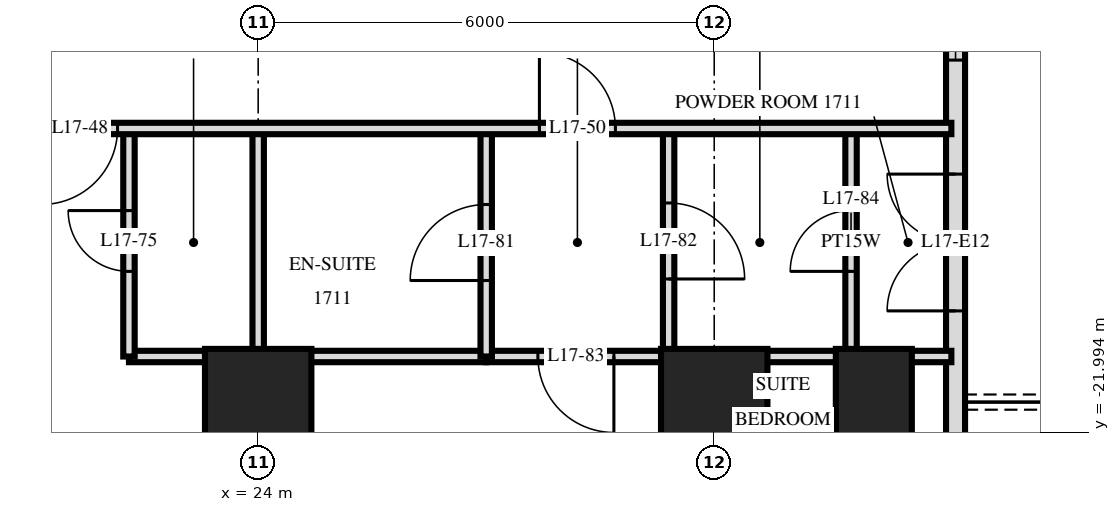
"""IFC4 building model, lengths in metres.
Left out: names, types, materials, properties, quantities, classifications, styles, units other than length and angle.
Written with IfcOpenShell. Run it as: python <this file> out.ifc"""

import sys

from ifc_helpers import new_model, si_unit, direction, frame, frame_2d, origin, origin_2d, place, context, subcontext, project, spatial, rectangle, extrude, element, fill, save


model = new_model("IFC4")
c1 = context("Model", 3, precision=1e-05, world=origin(), true_north=direction((0.0, 1.0)))
c2 = subcontext(c1, "Body", "Model", "MODEL_VIEW")
j1 = project(units=[si_unit("LENGTHUNIT", "METRE"), si_unit("PLANEANGLEUNIT", "RADIAN")], contexts=[c1])
p1 = place(None, origin())
s1 = spatial("IfcSite", under=j1, at=p1, CompositionType="ELEMENT")
p2 = place(p1, origin())
s2 = spatial("IfcBuilding", under=s1, at=p2, CompositionType="ELEMENT")
p3 = place(p2, frame((0.0, 0.0, 70.8)))
s3 = spatial("IfcBuildingStorey", under=s2, at=p3, CompositionType="ELEMENT", Elevation=70.8)
for number, where, z_axis, x_axis in (
    (1, (24.0, -21.6, 0.0), (0.0, 0.0, 1.0), (1.0, 0.0, 0.0)),
    (2, (30.0, -21.6, 0.0), (0.0, 0.0, 1.0), (1.0, 0.0, 0.0)),
):
    element("IfcColumn", number, at=place(p3, frame(where, z_axis=z_axis, x_axis=x_axis)), inside=s3, PredefinedType="COLUMN", context=c2, shape_type="SweptSolid", body=[
        extrude(rectangle(XDim=1.4, YDim=1.4, at=origin_2d()), origin(), (0.0, 0.0, 1.0), 3.6),
    ])
p4 = place(p3, frame((32.1, -21.6, 0.0), z_axis=(0.0, 0.0, 1.0), x_axis=(0.0, 1.0, 0.0)))
e3 = element("IfcColumn", 3, at=p4, inside=s3, PredefinedType="COLUMN", context=c2, shape_type="SweptSolid", body=[
    extrude(rectangle(XDim=1.4, YDim=1.0, at=origin_2d()), origin(), (0.0, 0.0, 1.0), 3.6),
])
p5 = place(p3, frame((33.175, -24.875, 0.0), z_axis=(0.0, 0.0, 1.0), x_axis=(0.0, 1.0, 0.0)))
e4 = element("IfcWall", 4, at=p5, inside=s3, PredefinedType="SOLIDWALL", context=c2, shape_type="SweptSolid", body=[
    extrude(rectangle(XDim=21.551, YDim=0.25, at=frame_2d((10.775, 0.0))), origin(), (0.0, 0.0, 1.0), 3.32),
])
p6 = place(p5, frame((0.575, 0.0, 0.0)))
e5 = element("IfcOpeningElement", 5, at=p6, cuts=e4, PredefinedType="OPENING", context=c2, shape_type="SweptSolid", body=[
    extrude(rectangle(XDim=1.8, YDim=2.4, at=frame_2d((0.9, 1.2))), frame((0.0, 0.135, 0.0), z_axis=(0.0, -1.0, 0.0), x_axis=(1.0, 0.0, 0.0)), (0.0, 0.0, 1.0), 0.27),
])
p7 = place(p5, frame((4.475, 0.0, 0.0)))
e6 = element("IfcOpeningElement", 6, at=p7, cuts=e4, PredefinedType="OPENING", context=c2, shape_type="SweptSolid", body=[
    extrude(rectangle(XDim=1.8, YDim=2.4, at=frame_2d((0.9, 1.2))), frame((0.0, 0.135, 0.0), z_axis=(0.0, -1.0, 0.0), x_axis=(1.0, 0.0, 0.0)), (0.0, 0.0, 1.0), 0.27),
])
p8 = place(p5, frame((7.775, 0.0, 0.3)))
e7 = element("IfcOpeningElement", 7, at=p8, cuts=e4, PredefinedType="OPENING", context=c2, shape_type="SweptSolid", body=[
    extrude(rectangle(XDim=1.2, YDim=2.1, at=frame_2d((0.6, 1.05))), frame((0.0, 0.135, 0.0), z_axis=(0.0, -1.0, 0.0), x_axis=(1.0, 0.0, 0.0)), (0.0, 0.0, 1.0), 0.27),
])
p9 = place(p5, frame((13.1, 0.0, 0.0)))
e8 = element("IfcOpeningElement", 8, at=p9, cuts=e4, PredefinedType="OPENING", context=c2, shape_type="SweptSolid", body=[
    extrude(rectangle(XDim=1.8, YDim=2.4, at=frame_2d((0.9, 1.2))), frame((0.0, 0.135, 0.0), z_axis=(0.0, -1.0, 0.0), x_axis=(1.0, 0.0, 0.0)), (0.0, 0.0, 1.0), 0.27),
])
p10 = place(p3, frame((31.8, -21.0, 0.0), z_axis=(0.0, 0.0, 1.0), x_axis=(0.0, 1.0, 0.0)))
e9 = element("IfcWall", 9, at=p10, inside=s3, PredefinedType="PLUMBINGWALL", context=c2, shape_type="SweptSolid", body=[
    extrude(rectangle(XDim=3.0, YDim=0.15, at=frame_2d((1.5, 0.0))), origin(), (0.0, 0.0, 1.0), 3.32),
])
p11 = place(p10, frame((1.12, 0.0, 0.0)))
e10 = element("IfcOpeningElement", 10, at=p11, cuts=e9, PredefinedType="OPENING", context=c2, shape_type="SweptSolid", body=[
    extrude(rectangle(XDim=0.8, YDim=2.1, at=frame_2d((0.4, 1.05))), frame((0.0, 0.085, 0.0), z_axis=(0.0, -1.0, 0.0), x_axis=(1.0, 0.0, 0.0)), (0.0, 0.0, 1.0), 0.17),
])
p12 = place(p3, frame((30.0, -28.978, 0.0), z_axis=(0.0, 0.0, 1.0), x_axis=(0.0, 1.0, 0.0)))
e11 = element("IfcWall", 11, at=p12, inside=s3, PredefinedType="PARTITIONING", context=c2, shape_type="SweptSolid", body=[
    extrude(rectangle(XDim=7.978, YDim=0.15, at=frame_2d((3.989, 0.0))), origin(), (0.0, 0.0, 1.0), 3.32),
])
p13 = place(p12, frame((3.458, 0.0, 0.0)))
e12 = element("IfcOpeningElement", 12, at=p13, cuts=e11, PredefinedType="OPENING", context=c2, shape_type="SweptSolid", body=[
    extrude(rectangle(XDim=0.9, YDim=2.1, at=frame_2d((0.45, 1.05))), frame((0.0, 0.085, 0.0), z_axis=(0.0, -1.0, 0.0), x_axis=(1.0, 0.0, 0.0)), (0.0, 0.0, 1.0), 0.17),
])
p14 = place(p3, frame((29.4, -21.0, 0.0), z_axis=(0.0, 0.0, 1.0), x_axis=(0.0, 1.0, 0.0)))
e13 = element("IfcWall", 13, at=p14, inside=s3, PredefinedType="PARTITIONING", context=c2, shape_type="SweptSolid", body=[
    extrude(rectangle(XDim=3.0, YDim=0.15, at=frame_2d((1.5, 0.0))), origin(), (0.0, 0.0, 1.0), 3.32),
])
p15 = place(p14, frame((1.02, 0.0, 0.0)))
e14 = element("IfcOpeningElement", 14, at=p15, cuts=e13, PredefinedType="OPENING", context=c2, shape_type="SweptSolid", body=[
    extrude(rectangle(XDim=1.0, YDim=2.1, at=frame_2d((0.5, 1.05))), frame((0.0, 0.085, 0.0), z_axis=(0.0, -1.0, 0.0), x_axis=(1.0, 0.0, 0.0)), (0.0, 0.0, 1.0), 0.17),
])
p16 = place(p3, frame((27.0, -21.0, 0.0), z_axis=(0.0, 0.0, 1.0), x_axis=(0.0, 1.0, 0.0)))
e15 = element("IfcWall", 15, at=p16, inside=s3, PredefinedType="PARTITIONING", context=c2, shape_type="SweptSolid", body=[
    extrude(rectangle(XDim=3.0, YDim=0.15, at=frame_2d((1.5, 0.0))), origin(), (0.0, 0.0, 1.0), 3.32),
])
p17 = place(p16, frame((1.0, 0.0, 0.0)))
e16 = element("IfcOpeningElement", 16, at=p17, cuts=e15, PredefinedType="OPENING", context=c2, shape_type="SweptSolid", body=[
    extrude(rectangle(XDim=1.0, YDim=2.1, at=frame_2d((0.5, 1.05))), frame((0.0, 0.085, 0.0), z_axis=(0.0, -1.0, 0.0), x_axis=(1.0, 0.0, 0.0)), (0.0, 0.0, 1.0), 0.17),
])
p18 = place(p3, frame((24.0, -29.22, 0.0), z_axis=(0.0, 0.0, 1.0), x_axis=(0.0, 1.0, 0.0)))
e17 = element("IfcWall", 17, at=p18, inside=s3, PredefinedType="PARTITIONING", context=c2, shape_type="SweptSolid", body=[
    extrude(rectangle(XDim=11.22, YDim=0.15, at=frame_2d((5.61, 0.0))), origin(), (0.0, 0.0, 1.0), 3.32),
])
p19 = place(p3, frame((22.3, -21.0, 0.0), z_axis=(0.0, 0.0, 1.0), x_axis=(0.0, 1.0, 0.0)))
e18 = element("IfcWall", 18, at=p19, inside=s3, PredefinedType="PARTITIONING", context=c2, shape_type="SweptSolid", body=[
    extrude(rectangle(XDim=3.0, YDim=0.15, at=frame_2d((1.5, 0.0))), origin(), (0.0, 0.0, 1.0), 3.32),
])
p20 = place(p19, frame((1.12, 0.0, 0.0)))
e19 = element("IfcOpeningElement", 19, at=p20, cuts=e18, PredefinedType="OPENING", context=c2, shape_type="SweptSolid", body=[
    extrude(rectangle(XDim=0.8, YDim=2.1, at=frame_2d((0.4, 1.05))), frame((0.0, 0.085, 0.0), z_axis=(0.0, -1.0, 0.0), x_axis=(1.0, 0.0, 0.0)), (0.0, 0.0, 1.0), 0.17),
])
p21 = place(p3, frame((27.0, -21.0, 0.0), z_axis=(0.0, 0.0, 1.0), x_axis=(1.0, 0.0, 0.0)))
e20 = element("IfcWall", 20, at=p21, inside=s3, PredefinedType="PARTITIONING", context=c2, shape_type="SweptSolid", body=[
    extrude(rectangle(XDim=2.4, YDim=0.15, at=frame_2d((1.2, 0.0))), origin(), (0.0, 0.0, 1.0), 3.32),
])
p22 = place(p21, frame((0.68, 0.0, 0.0)))
e21 = element("IfcOpeningElement", 21, at=p22, cuts=e20, PredefinedType="OPENING", context=c2, shape_type="SweptSolid", body=[
    extrude(rectangle(XDim=1.0, YDim=2.1, at=frame_2d((0.5, 1.05))), frame((0.0, 0.085, 0.0), z_axis=(0.0, -1.0, 0.0), x_axis=(1.0, 0.0, 0.0)), (0.0, 0.0, 1.0), 0.17),
])
p23 = place(p3, frame((22.3, -21.0, 0.0), z_axis=(0.0, 0.0, 1.0), x_axis=(1.0, 0.0, 0.0)))
e22 = element("IfcWall", 22, at=p23, inside=s3, PredefinedType="PARTITIONING", context=c2, shape_type="SweptSolid", body=[
    extrude(rectangle(XDim=4.7, YDim=0.15, at=frame_2d((2.35, 0.0))), origin(), (0.0, 0.0, 1.0), 3.32),
])
p24 = place(p3, frame((29.4, -21.0, 0.0), z_axis=(0.0, 0.0, 1.0), x_axis=(1.0, 0.0, 0.0)))
e23 = element("IfcWall", 23, at=p24, inside=s3, PredefinedType="PARTITIONING", context=c2, shape_type="SweptSolid", body=[
    extrude(rectangle(XDim=2.4, YDim=0.15, at=frame_2d((1.2, 0.0))), origin(), (0.0, 0.0, 1.0), 3.32),
])
p25 = place(p3, frame((31.8, -21.0, 0.0), z_axis=(0.0, 0.0, 1.0), x_axis=(1.0, 0.0, 0.0)))
e24 = element("IfcWall", 24, at=p25, inside=s3, PredefinedType="PLUMBINGWALL", context=c2, shape_type="SweptSolid", body=[
    extrude(rectangle(XDim=1.32, YDim=0.15, at=frame_2d((0.66, 0.0))), origin(), (0.0, 0.0, 1.0), 3.32),
])
p26 = place(p3, frame((-33.12, -18.0, 0.0), z_axis=(0.0, 0.0, 1.0), x_axis=(1.0, 0.0, 0.0)))
e25 = element("IfcWall", 25, at=p26, inside=s3, PredefinedType="PARTITIONING", context=c2, shape_type="SweptSolid", body=[
    extrude(rectangle(XDim=66.24, YDim=0.15, at=frame_2d((33.12, 0.0))), origin(), (0.0, 0.0, 1.0), 3.32),
])
p27 = place(p26, frame((15.27, 0.0, 0.0)))
e26 = element("IfcOpeningElement", 26, at=p27, cuts=e25, PredefinedType="OPENING", context=c2, shape_type="SweptSolid", body=[
    extrude(rectangle(XDim=1.0, YDim=2.1, at=frame_2d((0.5, 1.05))), frame((0.0, 0.085, 0.0), z_axis=(0.0, -1.0, 0.0), x_axis=(1.0, 0.0, 0.0)), (0.0, 0.0, 1.0), 0.17),
])
p28 = place(p26, frame((21.22, 0.0, 0.0)))
e27 = element("IfcOpeningElement", 27, at=p28, cuts=e25, PredefinedType="OPENING", context=c2, shape_type="SweptSolid", body=[
    extrude(rectangle(XDim=1.0, YDim=2.1, at=frame_2d((0.5, 1.05))), frame((0.0, 0.085, 0.0), z_axis=(0.0, -1.0, 0.0), x_axis=(1.0, 0.0, 0.0)), (0.0, 0.0, 1.0), 0.17),
])
p29 = place(p26, frame((24.27, 0.0, 0.0)))
e28 = element("IfcOpeningElement", 28, at=p29, cuts=e25, PredefinedType="OPENING", context=c2, shape_type="SweptSolid", body=[
    extrude(rectangle(XDim=1.0, YDim=2.1, at=frame_2d((0.5, 1.05))), frame((0.0, 0.085, 0.0), z_axis=(0.0, -1.0, 0.0), x_axis=(1.0, 0.0, 0.0)), (0.0, 0.0, 1.0), 0.17),
])
p30 = place(p26, frame((30.97, 0.0, 0.0)))
e29 = element("IfcOpeningElement", 29, at=p30, cuts=e25, PredefinedType="OPENING", context=c2, shape_type="SweptSolid", body=[
    extrude(rectangle(XDim=1.0, YDim=2.1, at=frame_2d((0.5, 1.05))), frame((0.0, 0.085, 0.0), z_axis=(0.0, -1.0, 0.0), x_axis=(1.0, 0.0, 0.0)), (0.0, 0.0, 1.0), 0.17),
])
p31 = place(p26, frame((40.42, 0.0, 0.0)))
e30 = element("IfcOpeningElement", 30, at=p31, cuts=e25, PredefinedType="OPENING", context=c2, shape_type="SweptSolid", body=[
    extrude(rectangle(XDim=1.0, YDim=2.1, at=frame_2d((0.5, 1.05))), frame((0.0, 0.085, 0.0), z_axis=(0.0, -1.0, 0.0), x_axis=(1.0, 0.0, 0.0)), (0.0, 0.0, 1.0), 0.17),
])
p32 = place(p26, frame((43.97, 0.0, 0.0)))
e31 = element("IfcOpeningElement", 31, at=p32, cuts=e25, PredefinedType="OPENING", context=c2, shape_type="SweptSolid", body=[
    extrude(rectangle(XDim=1.0, YDim=2.1, at=frame_2d((0.5, 1.05))), frame((0.0, 0.085, 0.0), z_axis=(0.0, -1.0, 0.0), x_axis=(1.0, 0.0, 0.0)), (0.0, 0.0, 1.0), 0.17),
])
p33 = place(p26, frame((45.52, 0.0, 0.0)))
e32 = element("IfcOpeningElement", 32, at=p33, cuts=e25, PredefinedType="OPENING", context=c2, shape_type="SweptSolid", body=[
    extrude(rectangle(XDim=1.0, YDim=2.1, at=frame_2d((0.5, 1.05))), frame((0.0, 0.085, 0.0), z_axis=(0.0, -1.0, 0.0), x_axis=(1.0, 0.0, 0.0)), (0.0, 0.0, 1.0), 0.17),
])
p34 = place(p26, frame((52.97, 0.0, 0.0)))
e33 = element("IfcOpeningElement", 33, at=p34, cuts=e25, PredefinedType="OPENING", context=c2, shape_type="SweptSolid", body=[
    extrude(rectangle(XDim=1.0, YDim=2.1, at=frame_2d((0.5, 1.05))), frame((0.0, 0.085, 0.0), z_axis=(0.0, -1.0, 0.0), x_axis=(1.0, 0.0, 0.0)), (0.0, 0.0, 1.0), 0.17),
])
p35 = place(p26, frame((54.27, 0.0, 0.0)))
e34 = element("IfcOpeningElement", 34, at=p35, cuts=e25, PredefinedType="OPENING", context=c2, shape_type="SweptSolid", body=[
    extrude(rectangle(XDim=1.0, YDim=2.1, at=frame_2d((0.5, 1.05))), frame((0.0, 0.085, 0.0), z_axis=(0.0, -1.0, 0.0), x_axis=(1.0, 0.0, 0.0)), (0.0, 0.0, 1.0), 0.17),
])
p36 = place(p26, frame((13.42, 0.0, 0.0)))
e35 = element("IfcOpeningElement", 35, at=p36, cuts=e25, PredefinedType="OPENING", context=c2, shape_type="SweptSolid", body=[
    extrude(rectangle(XDim=1.0, YDim=2.1, at=frame_2d((0.5, 1.05))), frame((0.0, 0.085, 0.0), z_axis=(0.0, -1.0, 0.0), x_axis=(1.0, 0.0, 0.0)), (0.0, 0.0, 1.0), 0.17),
])
p37 = place(p26, frame((60.82, 0.0, 0.0)))
e36 = element("IfcOpeningElement", 36, at=p37, cuts=e25, PredefinedType="OPENING", context=c2, shape_type="SweptSolid", body=[
    extrude(rectangle(XDim=1.0, YDim=2.1, at=frame_2d((0.5, 1.05))), frame((0.0, 0.085, 0.0), z_axis=(0.0, -1.0, 0.0), x_axis=(1.0, 0.0, 0.0)), (0.0, 0.0, 1.0), 0.17),
])
p38 = place(p7, origin())
e37 = element("IfcDoor", 37, at=p38, inside=s3, OperationType="DOUBLE_DOOR_SINGLE_SWING", PredefinedType="DOOR", context=c2, shape_type="SweptSolid", body=[
    extrude(rectangle(XDim=1.8, YDim=2.4, at=frame_2d((0.9, 1.2))), frame((0.0, 0.025, 0.0), z_axis=(0.0, -1.0, 0.0), x_axis=(1.0, 0.0, 0.0)), (0.0, 0.0, 1.0), 0.05),
])
fill(e6, e37)
p39 = place(p8, origin())
e38 = element("IfcWindow", 38, at=p39, inside=s3, PartitioningType="SINGLE_PANEL", PredefinedType="WINDOW", context=c2, shape_type="SweptSolid", body=[
    extrude(rectangle(XDim=1.2, YDim=2.1, at=frame_2d((0.6, 1.05))), frame((0.0, 0.03, 0.0), z_axis=(0.0, -1.0, 0.0), x_axis=(1.0, 0.0, 0.0)), (0.0, 0.0, 1.0), 0.06),
])
fill(e7, e38)
p40 = place(p35, frame((0.5, 0.0, 0.0), z_axis=(0.0, 0.0, 1.0), x_axis=(-1.0, 0.0, 0.0)))
e39 = element("IfcDoor", 39, at=p40, inside=s3, OperationType="SINGLE_SWING_LEFT", PredefinedType="DOOR", context=c2, shape_type="SweptSolid", body=[
    extrude(rectangle(XDim=1.0, YDim=2.1, at=frame_2d((0.0, 1.05))), frame((0.0, -0.025, 0.0), z_axis=(0.0, 1.0, 0.0), x_axis=(-1.0, 0.0, 0.0)), (0.0, 0.0, 1.0), 0.05),
])
fill(e34, e39)
p41 = place(p37, origin())
e40 = element("IfcDoor", 40, at=p41, inside=s3, OperationType="SINGLE_SWING_RIGHT", PredefinedType="DOOR", context=c2, shape_type="SweptSolid", body=[
    extrude(rectangle(XDim=1.0, YDim=2.1, at=frame_2d((0.5, 1.05))), frame((0.0, 0.025, 0.0), z_axis=(0.0, -1.0, 0.0), x_axis=(1.0, 0.0, 0.0)), (0.0, 0.0, 1.0), 0.05),
])
fill(e36, e40)
p42 = place(p20, origin())
e41 = element("IfcDoor", 41, at=p42, inside=s3, OperationType="SINGLE_SWING_LEFT", PredefinedType="DOOR", context=c2, shape_type="SweptSolid", body=[
    extrude(rectangle(XDim=0.8, YDim=2.1, at=frame_2d((0.4, 1.05))), frame((0.0, 0.025, 0.0), z_axis=(0.0, -1.0, 0.0), x_axis=(1.0, 0.0, 0.0)), (0.0, 0.0, 1.0), 0.05),
])
fill(e19, e41)
p43 = place(p17, origin())
e42 = element("IfcDoor", 42, at=p43, inside=s3, OperationType="SINGLE_SWING_RIGHT", PredefinedType="DOOR", context=c2, shape_type="SweptSolid", body=[
    extrude(rectangle(XDim=1.0, YDim=2.1, at=frame_2d((0.5, 1.05))), frame((0.0, 0.025, 0.0), z_axis=(0.0, -1.0, 0.0), x_axis=(1.0, 0.0, 0.0)), (0.0, 0.0, 1.0), 0.05),
])
fill(e16, e42)
p44 = place(p15, frame((0.5, 0.0, 0.0), z_axis=(0.0, 0.0, 1.0), x_axis=(-1.0, 0.0, 0.0)))
e43 = element("IfcDoor", 43, at=p44, inside=s3, OperationType="SINGLE_SWING_LEFT", PredefinedType="DOOR", context=c2, shape_type="SweptSolid", body=[
    extrude(rectangle(XDim=1.0, YDim=2.1, at=frame_2d((0.0, 1.05))), frame((0.0, -0.025, 0.0), z_axis=(0.0, 1.0, 0.0), x_axis=(-1.0, 0.0, 0.0)), (0.0, 0.0, 1.0), 0.05),
])
fill(e14, e43)
p45 = place(p22, frame((0.5, 0.0, 0.0), z_axis=(0.0, 0.0, 1.0), x_axis=(-1.0, 0.0, 0.0)))
e44 = element("IfcDoor", 44, at=p45, inside=s3, OperationType="SINGLE_SWING_RIGHT", PredefinedType="DOOR", context=c2, shape_type="SweptSolid", body=[
    extrude(rectangle(XDim=1.0, YDim=2.1, at=frame_2d((0.0, 1.05))), frame((0.0, -0.025, 0.0), z_axis=(0.0, 1.0, 0.0), x_axis=(-1.0, 0.0, 0.0)), (0.0, 0.0, 1.0), 0.05),
])
fill(e21, e44)
p46 = place(p11, origin())
e45 = element("IfcDoor", 45, at=p46, inside=s3, OperationType="SINGLE_SWING_RIGHT", PredefinedType="DOOR", context=c2, shape_type="SweptSolid", body=[
    extrude(rectangle(XDim=0.8, YDim=2.1, at=frame_2d((0.4, 1.05))), frame((0.0, 0.025, 0.0), z_axis=(0.0, -1.0, 0.0), x_axis=(1.0, 0.0, 0.0)), (0.0, 0.0, 1.0), 0.05),
])
fill(e10, e45)
save(model, sys.argv[1])
